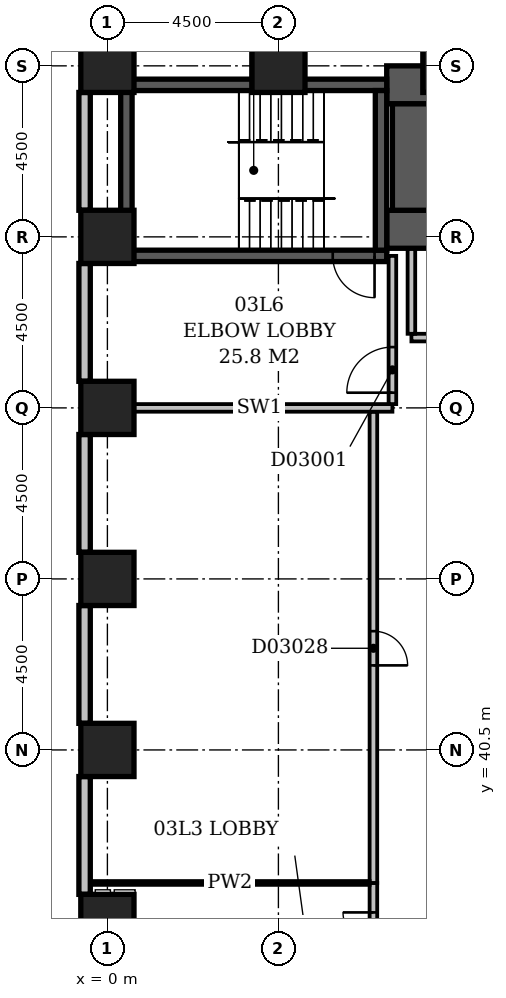
"""IFC4 building model, lengths in metres.
Left out: names, types, materials, properties, quantities, classifications, styles, units other than length and angle.
Written with IfcOpenShell. Run it as: python <this file> out.ifc"""

import sys

from ifc_helpers import new_model, si_unit, direction, frame, frame_2d, origin, origin_2d, place, context, subcontext, project, spatial, rectangle, extrude, element, fill, save


model = new_model("IFC4")
c1 = context("Model", 3, precision=1e-05, world=origin(), true_north=direction((0.0, 1.0)))
c2 = subcontext(c1, "Body", "Model", "MODEL_VIEW")
j1 = project(units=[si_unit("LENGTHUNIT", "METRE"), si_unit("PLANEANGLEUNIT", "RADIAN")], contexts=[c1])
p1 = place(None, origin())
s1 = spatial("IfcSite", under=j1, at=p1, CompositionType="ELEMENT")
p2 = place(p1, origin())
s2 = spatial("IfcBuilding", under=s1, at=p2, CompositionType="ELEMENT")
p3 = place(p2, frame((0.0, 0.0, 19.0)))
s3 = spatial("IfcBuildingStorey", under=s2, at=p3, CompositionType="ELEMENT", Elevation=19.0)
p4 = place(p3, frame((0.35, 53.5, -0.4), z_axis=(0.0, 0.0, 1.0), x_axis=(1.0, 0.0, 0.0)))
e1 = element("IfcWall", 1, at=p4, inside=s3, PredefinedType="SHEAR", context=c2, shape_type="SweptSolid", body=[
    extrude(rectangle(XDim=7.0, YDim=0.3, at=frame_2d((3.5, 0.0))), origin(), (0.0, 0.0, 1.0), 4.95),
])
p5 = place(p4, frame((5.58, 0.0, 0.4)))
e2 = element("IfcOpeningElement", 2, at=p5, cuts=e1, PredefinedType="OPENING", context=c2, shape_type="SweptSolid", body=[
    extrude(rectangle(XDim=1.1, YDim=2.1, at=frame_2d((0.55, 1.05))), frame((0.0, 0.162, 0.0), z_axis=(0.0, -1.0, 0.0), x_axis=(1.0, 0.0, 0.0)), (0.0, 0.0, 1.0), 0.324),
])
p6 = place(p3, frame((0.35, 58.0, -0.4), z_axis=(0.0, 0.0, 1.0), x_axis=(1.0, 0.0, 0.0)))
e3 = element("IfcWall", 3, at=p6, inside=s3, PredefinedType="SHEAR", context=c2, shape_type="SweptSolid", body=[
    extrude(rectangle(XDim=7.0, YDim=0.3, at=frame_2d((3.5, 0.0))), origin(), (0.0, 0.0, 1.0), 4.95),
])
for number, where, z_axis, x_axis in (
    (4, (0.5, 53.65, -0.4), (0.0, 0.0, 1.0), (0.0, 1.0, 0.0)),
    (5, (7.2, 53.65, -0.4), (0.0, 0.0, 1.0), (0.0, 1.0, 0.0)),
):
    element("IfcWall", number, at=place(p3, frame(where, z_axis=z_axis, x_axis=x_axis)), inside=s3, PredefinedType="SHEAR", context=c2, shape_type="SweptSolid", body=[
        extrude(rectangle(XDim=4.2, YDim=0.3, at=frame_2d((2.1, 0.0))), origin(), (0.0, 0.0, 1.0), 4.95),
    ])
p7 = place(p3, frame((7.35, 54.2, -0.4), z_axis=(0.0, 0.0, 1.0), x_axis=(1.0, 0.0, 0.0)))
e6 = element("IfcWall", 6, at=p7, inside=s3, PredefinedType="SHEAR", context=c2, shape_type="SweptSolid", body=[
    extrude(rectangle(XDim=16.35, YDim=1.0, at=frame_2d((8.175, 0.0))), origin(), (0.0, 0.0, 1.0), 4.95),
])
p8 = place(p7, frame((1.35, 0.0, 0.4)))
e7 = element("IfcOpeningElement", 7, at=p8, cuts=e6, PredefinedType="OPENING", context=c2, shape_type="SweptSolid", body=[
    extrude(rectangle(XDim=1.1, YDim=2.1, at=frame_2d((0.55, 1.05))), frame((0.0, 0.512, 0.0), z_axis=(0.0, -1.0, 0.0), x_axis=(1.0, 0.0, 0.0)), (0.0, 0.0, 1.0), 1.024),
])
p9 = place(p7, frame((3.85, 0.0, 0.4)))
e8 = element("IfcOpeningElement", 8, at=p9, cuts=e6, PredefinedType="OPENING", context=c2, shape_type="SweptSolid", body=[
    extrude(rectangle(XDim=1.1, YDim=2.1, at=frame_2d((0.55, 1.05))), frame((0.0, 0.512, 0.0), z_axis=(0.0, -1.0, 0.0), x_axis=(1.0, 0.0, 0.0)), (0.0, 0.0, 1.0), 1.024),
])
p10 = place(p7, frame((6.35, 0.0, 0.4)))
e9 = element("IfcOpeningElement", 9, at=p10, cuts=e6, PredefinedType="OPENING", context=c2, shape_type="SweptSolid", body=[
    extrude(rectangle(XDim=1.1, YDim=2.1, at=frame_2d((0.55, 1.05))), frame((0.0, 0.512, 0.0), z_axis=(0.0, -1.0, 0.0), x_axis=(1.0, 0.0, 0.0)), (0.0, 0.0, 1.0), 1.024),
])
p11 = place(p7, frame((8.85, 0.0, 0.4)))
e10 = element("IfcOpeningElement", 10, at=p11, cuts=e6, PredefinedType="OPENING", context=c2, shape_type="SweptSolid", body=[
    extrude(rectangle(XDim=1.1, YDim=2.1, at=frame_2d((0.55, 1.05))), frame((0.0, 0.512, 0.0), z_axis=(0.0, -1.0, 0.0), x_axis=(1.0, 0.0, 0.0)), (0.0, 0.0, 1.0), 1.024),
])
p12 = place(p7, frame((11.35, 0.0, 0.4)))
e11 = element("IfcOpeningElement", 11, at=p12, cuts=e6, PredefinedType="OPENING", context=c2, shape_type="SweptSolid", body=[
    extrude(rectangle(XDim=1.1, YDim=2.1, at=frame_2d((0.55, 1.05))), frame((0.0, 0.512, 0.0), z_axis=(0.0, -1.0, 0.0), x_axis=(1.0, 0.0, 0.0)), (0.0, 0.0, 1.0), 1.024),
])
p13 = place(p7, frame((13.85, 0.0, 0.4)))
e12 = element("IfcOpeningElement", 12, at=p13, cuts=e6, PredefinedType="OPENING", context=c2, shape_type="SweptSolid", body=[
    extrude(rectangle(XDim=1.1, YDim=2.1, at=frame_2d((0.55, 1.05))), frame((0.0, 0.512, 0.0), z_axis=(0.0, -1.0, 0.0), x_axis=(1.0, 0.0, 0.0)), (0.0, 0.0, 1.0), 1.024),
])
p14 = place(p3, frame((7.35, 58.0, -0.4), z_axis=(0.0, 0.0, 1.0), x_axis=(1.0, 0.0, 0.0)))
e13 = element("IfcWall", 13, at=p14, inside=s3, PredefinedType="SHEAR", context=c2, shape_type="SweptSolid", body=[
    extrude(rectangle(XDim=16.35, YDim=1.0, at=frame_2d((8.175, 0.0))), origin(), (0.0, 0.0, 1.0), 4.95),
])
p15 = place(p3, frame((8.0, 54.7, -0.4), z_axis=(0.0, 0.0, 1.0), x_axis=(0.0, 1.0, 0.0)))
e14 = element("IfcWall", 14, at=p15, inside=s3, PredefinedType="SHEAR", context=c2, shape_type="SweptSolid", body=[
    extrude(rectangle(XDim=2.8, YDim=1.0, at=frame_2d((1.4, 0.0))), origin(), (0.0, 0.0, 1.0), 4.95),
])
for number, where, z_axis, x_axis in (
    (15, (0.0, 36.0, -0.4), (0.0, 0.0, 1.0), (1.0, 0.0, 0.0)),
    (16, (0.0, 40.5, -0.4), (0.0, 0.0, 1.0), (1.0, 0.0, 0.0)),
    (17, (0.0, 45.0, -0.4), (0.0, 0.0, 1.0), (1.0, 0.0, 0.0)),
    (18, (0.0, 49.5, -0.4), (0.0, 0.0, 1.0), (1.0, 0.0, 0.0)),
    (19, (0.0, 54.0, -0.4), (0.0, 0.0, 1.0), (1.0, 0.0, 0.0)),
    (20, (0.0, 58.5, -0.4), (0.0, 0.0, 1.0), (1.0, 0.0, 0.0)),
    (21, (4.5, 58.5, -0.4), (0.0, 0.0, 1.0), (1.0, 0.0, 0.0)),
    (22, (9.0, 58.5, -0.4), (0.0, 0.0, 1.0), (1.0, 0.0, 0.0)),
):
    element("IfcColumn", number, at=place(p3, frame(where, z_axis=z_axis, x_axis=x_axis)), inside=s3, PredefinedType="COLUMN", context=c2, shape_type="SweptSolid", body=[
        extrude(rectangle(XDim=1.4, YDim=1.4, at=origin_2d()), origin(), (0.0, 0.0, 1.0), 4.95),
    ])
for number, where, z_axis, x_axis in (
    (23, (-0.6, 57.8, 0.0), (0.0, 0.0, 1.0), (0.0, -1.0, 0.0)),
    (24, (-0.6, 53.3, 0.0), (0.0, 0.0, 1.0), (0.0, -1.0, 0.0)),
    (25, (-0.6, 48.8, 0.0), (0.0, 0.0, 1.0), (0.0, -1.0, 0.0)),
    (26, (-0.6, 44.3, 0.0), (0.0, 0.0, 1.0), (0.0, -1.0, 0.0)),
    (27, (-0.6, 39.8, 0.0), (0.0, 0.0, 1.0), (0.0, -1.0, 0.0)),
):
    element("IfcWall", number, at=place(p3, frame(where, z_axis=z_axis, x_axis=x_axis)), inside=s3, PredefinedType="STANDARD", context=c2, shape_type="SweptSolid", body=[
        extrude(rectangle(XDim=3.1, YDim=0.3, at=frame_2d((1.55, 0.0))), origin(), (0.0, 0.0, 1.0), 3.9),
    ])
p16 = place(p3, frame((8.0, 51.35, 0.0), z_axis=(0.0, 0.0, 1.0), x_axis=(1.0, 0.0, 0.0)))
e28 = element("IfcWall", 28, at=p16, inside=s3, PredefinedType="PARTITIONING", context=c2, shape_type="SweptSolid", body=[
    extrude(rectangle(XDim=15.0, YDim=0.2, at=frame_2d((7.5, 0.0))), origin(), (0.0, 0.0, 1.0), 4.55),
])
p17 = place(p16, frame((3.4, 0.0, 0.0)))
e29 = element("IfcOpeningElement", 29, at=p17, cuts=e28, PredefinedType="OPENING", context=c2, shape_type="SweptSolid", body=[
    extrude(rectangle(XDim=1.2, YDim=2.1, at=frame_2d((0.6, 1.05))), frame((0.0, 0.112, 0.0), z_axis=(0.0, -1.0, 0.0), x_axis=(1.0, 0.0, 0.0)), (0.0, 0.0, 1.0), 0.224),
])
p18 = place(p16, frame((9.4, 0.0, 0.0)))
e30 = element("IfcOpeningElement", 30, at=p18, cuts=e28, PredefinedType="OPENING", context=c2, shape_type="SweptSolid", body=[
    extrude(rectangle(XDim=1.2, YDim=2.1, at=frame_2d((0.6, 1.05))), frame((0.0, 0.112, 0.0), z_axis=(0.0, -1.0, 0.0), x_axis=(1.0, 0.0, 0.0)), (0.0, 0.0, 1.0), 0.224),
])
p19 = place(p3, frame((8.0, 51.45, 0.0), z_axis=(0.0, 0.0, 1.0), x_axis=(0.0, 1.0, 0.0)))
e31 = element("IfcWall", 31, at=p19, inside=s3, PredefinedType="PARTITIONING", context=c2, shape_type="SweptSolid", body=[
    extrude(rectangle(XDim=2.23, YDim=0.2, at=frame_2d((1.115, 0.0))), origin(), (0.0, 0.0, 1.0), 4.55),
])
p20 = place(p3, frame((0.5, 49.5, 0.0), z_axis=(0.0, 0.0, 1.0), x_axis=(1.0, 0.0, 0.0)))
e32 = element("IfcWall", 32, at=p20, inside=s3, PredefinedType="PARTITIONING", context=c2, shape_type="SweptSolid", body=[
    extrude(rectangle(XDim=7.0, YDim=0.2, at=frame_2d((3.5, 0.0))), origin(), (0.0, 0.0, 1.0), 4.55),
])
p21 = place(p3, frame((7.5, 49.6, 0.0), z_axis=(0.0, 0.0, 1.0), x_axis=(0.0, 1.0, 0.0)))
e33 = element("IfcWall", 33, at=p21, inside=s3, PredefinedType="PARTITIONING", context=c2, shape_type="SweptSolid", body=[
    extrude(rectangle(XDim=3.9, YDim=0.2, at=frame_2d((1.95, 0.0))), origin(), (0.0, 0.0, 1.0), 4.55),
])
p22 = place(p21, frame((0.3, 0.0, 0.0)))
e34 = element("IfcOpeningElement", 34, at=p22, cuts=e33, PredefinedType="OPENING", context=c2, shape_type="SweptSolid", body=[
    extrude(rectangle(XDim=1.2, YDim=2.1, at=frame_2d((0.6, 1.05))), frame((0.0, 0.112, 0.0), z_axis=(0.0, -1.0, 0.0), x_axis=(1.0, 0.0, 0.0)), (0.0, 0.0, 1.0), 0.224),
])
p23 = place(p3, frame((-0.45, 37.0, 0.0), z_axis=(0.0, 0.0, 1.0), x_axis=(1.0, 0.0, 0.0)))
e35 = element("IfcWall", 35, at=p23, inside=s3, PredefinedType="PARTITIONING", context=c2, shape_type="SweptSolid", body=[
    extrude(rectangle(XDim=7.35, YDim=0.1, at=frame_2d((3.675, 0.0))), origin(), (0.0, 0.0, 1.0), 4.55),
])
p24 = place(p3, frame((7.0, 37.0, 0.0), z_axis=(0.0, 0.0, 1.0), x_axis=(0.0, -1.0, 0.0)))
e36 = element("IfcWall", 36, at=p24, inside=s3, PredefinedType="PARTITIONING", context=c2, shape_type="SweptSolid", body=[
    extrude(rectangle(XDim=2.4, YDim=0.2, at=frame_2d((1.2, 0.0))), origin(), (0.0, 0.0, 1.0), 4.55),
])
p25 = place(p24, frame((0.775, 0.0, 0.0)))
e37 = element("IfcOpeningElement", 37, at=p25, cuts=e36, PredefinedType="OPENING", context=c2, shape_type="SweptSolid", body=[
    extrude(rectangle(XDim=0.8, YDim=2.1, at=frame_2d((0.4, 1.05))), frame((0.0, 0.112, 0.0), z_axis=(0.0, -1.0, 0.0), x_axis=(1.0, 0.0, 0.0)), (0.0, 0.0, 1.0), 0.224),
])
p26 = place(p3, frame((7.0, 49.4, 0.0), z_axis=(0.0, 0.0, 1.0), x_axis=(0.0, -1.0, 0.0)))
e38 = element("IfcWall", 38, at=p26, inside=s3, PredefinedType="PARTITIONING", context=c2, shape_type="SweptSolid", body=[
    extrude(rectangle(XDim=12.4, YDim=0.2, at=frame_2d((6.2, 0.0))), origin(), (0.0, 0.0, 1.0), 4.55),
])
p27 = place(p26, frame((5.775, 0.0, 0.0)))
e39 = element("IfcOpeningElement", 39, at=p27, cuts=e38, PredefinedType="OPENING", context=c2, shape_type="SweptSolid", body=[
    extrude(rectangle(XDim=0.9, YDim=2.1, at=frame_2d((0.45, 1.05))), frame((0.0, 0.112, 0.0), z_axis=(0.0, -1.0, 0.0), x_axis=(1.0, 0.0, 0.0)), (0.0, 0.0, 1.0), 0.224),
])
p28 = place(p22, origin())
e40 = element("IfcDoor", 40, at=p28, inside=s3, OperationType="SINGLE_SWING_LEFT", PredefinedType="DOOR", context=c2, shape_type="SweptSolid", body=[
    extrude(rectangle(XDim=1.2, YDim=2.1, at=frame_2d((0.6, 1.05))), frame((0.0, 0.025, 0.0), z_axis=(0.0, -1.0, 0.0), x_axis=(1.0, 0.0, 0.0)), (0.0, 0.0, 1.0), 0.05),
])
fill(e34, e40)
p29 = place(p5, origin())
e41 = element("IfcDoor", 41, at=p29, inside=s3, OperationType="SINGLE_SWING_RIGHT", PredefinedType="DOOR", context=c2, shape_type="SweptSolid", body=[
    extrude(rectangle(XDim=1.1, YDim=2.1, at=frame_2d((0.55, 1.05))), frame((0.0, 0.025, 0.0), z_axis=(0.0, -1.0, 0.0), x_axis=(1.0, 0.0, 0.0)), (0.0, 0.0, 1.0), 0.05),
])
fill(e2, e41)
p30 = place(p25, frame((0.8, 0.0, 0.0), z_axis=(0.0, 0.0, 1.0), x_axis=(-1.0, 0.0, 0.0)))
e42 = element("IfcDoor", 42, at=p30, inside=s3, OperationType="SINGLE_SWING_RIGHT", PredefinedType="DOOR", context=c2, shape_type="SweptSolid", body=[
    extrude(rectangle(XDim=0.8, YDim=2.1, at=frame_2d((0.4, 1.05))), frame((0.0, 0.025, 0.0), z_axis=(0.0, -1.0, 0.0), x_axis=(1.0, 0.0, 0.0)), (0.0, 0.0, 1.0), 0.05),
])
fill(e37, e42)
p31 = place(p27, frame((0.9, 0.0, 0.0), z_axis=(0.0, 0.0, 1.0), x_axis=(-1.0, 0.0, 0.0)))
e43 = element("IfcDoor", 43, at=p31, inside=s3, OperationType="SINGLE_SWING_LEFT", PredefinedType="DOOR", context=c2, shape_type="SweptSolid", body=[
    extrude(rectangle(XDim=0.9, YDim=2.1, at=frame_2d((0.45, 1.05))), frame((0.0, 0.025, 0.0), z_axis=(0.0, -1.0, 0.0), x_axis=(1.0, 0.0, 0.0)), (0.0, 0.0, 1.0), 0.05),
])
fill(e39, e43)
save(model, sys.argv[1])
